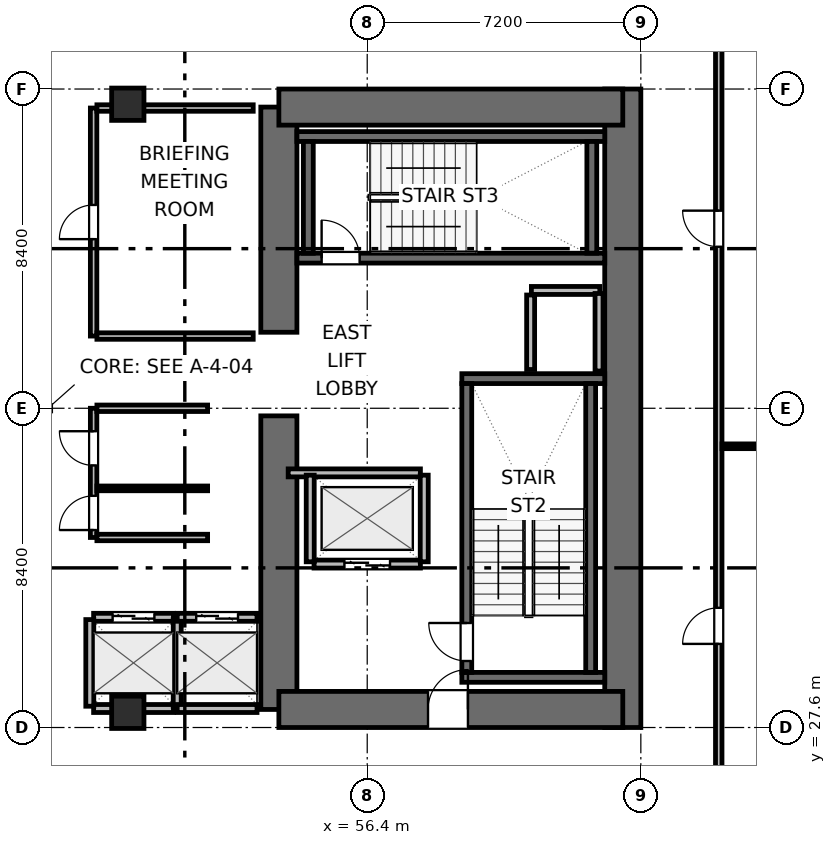
"""IFC4 building model, lengths in metres.
Left out: names, types, materials, properties, quantities, classifications, styles, units other than length and angle.
Written with IfcOpenShell. Run it as: python <this file> out.ifc"""

import sys

from ifc_helpers import new_model, si_unit, direction, frame, frame_2d, origin, origin_2d, place, context, subcontext, project, spatial, rectangle, extrude, element, fill, save


model = new_model("IFC4")
c1 = context("Model", 3, precision=1e-05, world=origin(), true_north=direction((0.0, 1.0)))
c2 = subcontext(c1, "Body", "Model", "MODEL_VIEW")
j1 = project(units=[si_unit("LENGTHUNIT", "METRE"), si_unit("PLANEANGLEUNIT", "RADIAN")], contexts=[c1])
p1 = place(None, origin())
s1 = spatial("IfcSite", under=j1, at=p1, CompositionType="ELEMENT")
p2 = place(p1, origin())
s2 = spatial("IfcBuilding", under=s1, at=p2, CompositionType="ELEMENT")
p3 = place(p2, frame((0.0, 0.0, 21.6)))
s3 = spatial("IfcBuildingStorey", under=s2, at=p3, CompositionType="ELEMENT", Elevation=21.6)
p4 = place(p3, frame((54.075, 28.075, 0.0), z_axis=(0.0, 0.0, 1.0), x_axis=(0.0, 1.0, 0.0)))
e1 = element("IfcWall", 1, at=p4, inside=s3, PredefinedType="SHEAR", context=c2, shape_type="SweptSolid", body=[
    extrude(rectangle(XDim=7.725, YDim=0.95, at=frame_2d((3.863, 0.0))), origin(), (0.0, 0.0, 1.0), 3.9),
])
p5 = place(p3, frame((54.075, 38.0, 0.0), z_axis=(0.0, 0.0, 1.0), x_axis=(0.0, 1.0, 0.0)))
e2 = element("IfcWall", 2, at=p5, inside=s3, PredefinedType="SHEAR", context=c2, shape_type="SweptSolid", body=[
    extrude(rectangle(XDim=5.925, YDim=0.95, at=frame_2d((2.962, 0.0))), origin(), (0.0, 0.0, 1.0), 3.9),
])
p6 = place(p3, frame((63.125, 27.6, 0.0), z_axis=(0.0, 0.0, 1.0), x_axis=(0.0, 1.0, 0.0)))
e3 = element("IfcWall", 3, at=p6, inside=s3, PredefinedType="SHEAR", context=c2, shape_type="SweptSolid", body=[
    extrude(rectangle(XDim=16.8, YDim=0.95, at=frame_2d((8.4, 0.0))), origin(), (0.0, 0.0, 1.0), 3.9),
])
p7 = place(p3, frame((54.075, 28.075, 0.0), z_axis=(0.0, 0.0, 1.0), x_axis=(1.0, 0.0, 0.0)))
e4 = element("IfcWall", 4, at=p7, inside=s3, PredefinedType="SHEAR", context=c2, shape_type="SweptSolid", body=[
    extrude(rectangle(XDim=9.05, YDim=0.95, at=frame_2d((4.525, 0.0))), origin(), (0.0, 0.0, 1.0), 3.9),
])
p8 = place(p7, frame((3.925, 0.0, 0.0)))
e5 = element("IfcOpeningElement", 5, at=p8, cuts=e4, PredefinedType="OPENING", context=c2, shape_type="SweptSolid", body=[
    extrude(rectangle(XDim=1.05, YDim=2.04, at=frame_2d((0.525, 1.02))), frame((0.0, 0.485, 0.0), z_axis=(0.0, -1.0, 0.0), x_axis=(1.0, 0.0, 0.0)), (0.0, 0.0, 1.0), 0.97),
])
p9 = place(p3, frame((54.075, 43.925, 0.0), z_axis=(0.0, 0.0, 1.0), x_axis=(1.0, 0.0, 0.0)))
e6 = element("IfcWall", 6, at=p9, inside=s3, PredefinedType="SHEAR", context=c2, shape_type="SweptSolid", body=[
    extrude(rectangle(XDim=9.05, YDim=0.95, at=frame_2d((4.525, 0.0))), origin(), (0.0, 0.0, 1.0), 3.9),
])
for number, where, z_axis, x_axis in (
    (7, (58.89, 28.92, 0.0), (0.0, 0.0, 1.0), (1.0, 0.0, 0.0)),
    (8, (58.89, 36.78, 0.0), (0.0, 0.0, 1.0), (1.0, 0.0, 0.0)),
):
    element("IfcWall", number, at=place(p3, frame(where, z_axis=z_axis, x_axis=x_axis)), inside=s3, PredefinedType="SHEAR", context=c2, shape_type="SweptSolid", body=[
        extrude(rectangle(XDim=3.76, YDim=0.26, at=frame_2d((1.88, 0.0))), origin(), (0.0, 0.0, 1.0), 3.9),
    ])
p10 = place(p3, frame((59.02, 29.05, 0.0), z_axis=(0.0, 0.0, 1.0), x_axis=(0.0, 1.0, 0.0)))
e9 = element("IfcWall", 9, at=p10, inside=s3, PredefinedType="SHEAR", context=c2, shape_type="SweptSolid", body=[
    extrude(rectangle(XDim=7.6, YDim=0.26, at=frame_2d((3.8, 0.0))), origin(), (0.0, 0.0, 1.0), 3.9),
])
p11 = place(p10, frame((0.3, 0.0, 0.0)))
e10 = element("IfcOpeningElement", 10, at=p11, cuts=e9, PredefinedType="OPENING", context=c2, shape_type="SweptSolid", body=[
    extrude(rectangle(XDim=1.0, YDim=2.04, at=frame_2d((0.5, 1.02))), frame((0.0, 0.14, 0.0), z_axis=(0.0, -1.0, 0.0), x_axis=(1.0, 0.0, 0.0)), (0.0, 0.0, 1.0), 0.28),
])
p12 = place(p3, frame((62.28, 29.05, 0.0), z_axis=(0.0, 0.0, 1.0), x_axis=(0.0, 1.0, 0.0)))
e11 = element("IfcWall", 11, at=p12, inside=s3, PredefinedType="SHEAR", context=c2, shape_type="SweptSolid", body=[
    extrude(rectangle(XDim=7.6, YDim=0.26, at=frame_2d((3.8, 0.0))), origin(), (0.0, 0.0, 1.0), 3.9),
])
p13 = place(p3, frame((54.55, 39.95, 0.0), z_axis=(0.0, 0.0, 1.0), x_axis=(1.0, 0.0, 0.0)))
e12 = element("IfcWall", 12, at=p13, inside=s3, PredefinedType="SHEAR", context=c2, shape_type="SweptSolid", body=[
    extrude(rectangle(XDim=8.1, YDim=0.26, at=frame_2d((4.05, 0.0))), origin(), (0.0, 0.0, 1.0), 3.9),
])
p14 = place(p13, frame((0.65, 0.0, 0.0)))
e13 = element("IfcOpeningElement", 13, at=p14, cuts=e12, PredefinedType="OPENING", context=c2, shape_type="SweptSolid", body=[
    extrude(rectangle(XDim=1.0, YDim=2.04, at=frame_2d((0.5, 1.02))), frame((0.0, 0.14, 0.0), z_axis=(0.0, -1.0, 0.0), x_axis=(1.0, 0.0, 0.0)), (0.0, 0.0, 1.0), 0.28),
])
p15 = place(p3, frame((54.55, 43.15, 0.0), z_axis=(0.0, 0.0, 1.0), x_axis=(1.0, 0.0, 0.0)))
e14 = element("IfcWall", 14, at=p15, inside=s3, PredefinedType="SHEAR", context=c2, shape_type="SweptSolid", body=[
    extrude(rectangle(XDim=8.1, YDim=0.26, at=frame_2d((4.05, 0.0))), origin(), (0.0, 0.0, 1.0), 3.9),
])
for number, where, z_axis, x_axis in (
    (15, (54.85, 40.08, 0.0), (0.0, 0.0, 1.0), (0.0, 1.0, 0.0)),
    (16, (62.31, 40.08, 0.0), (0.0, 0.0, 1.0), (0.0, 1.0, 0.0)),
):
    element("IfcWall", number, at=place(p3, frame(where, z_axis=z_axis, x_axis=x_axis)), inside=s3, PredefinedType="SHEAR", context=c2, shape_type="SweptSolid", body=[
        extrude(rectangle(XDim=2.94, YDim=0.26, at=frame_2d((1.47, 0.0))), origin(), (0.0, 0.0, 1.0), 3.9),
    ])
for number, where, z_axis, x_axis in (
    (17, (50.1, 28.0, 0.0), (0.0, 0.0, 1.0), (1.0, 0.0, 0.0)),
    (18, (50.1, 44.0, 0.0), (0.0, 0.0, 1.0), (1.0, 0.0, 0.0)),
):
    element("IfcColumn", number, at=place(p3, frame(where, z_axis=z_axis, x_axis=x_axis)), inside=s3, PredefinedType="COLUMN", context=c2, shape_type="SweptSolid", body=[
        extrude(rectangle(XDim=0.85, YDim=0.85, at=origin_2d()), origin(), (0.0, 0.0, 1.0), 3.9),
    ])
p16 = place(p3, frame((60.72, 39.1, 0.0), z_axis=(0.0, 0.0, 1.0), x_axis=(1.0, 0.0, 0.0)))
e19 = element("IfcWall", 19, at=p16, inside=s3, PredefinedType="PARTITIONING", context=c2, shape_type="SweptSolid", body=[
    extrude(rectangle(XDim=1.8, YDim=0.21, at=frame_2d((0.9, 0.0))), origin(), (0.0, 0.0, 1.0), 3.64),
])
p17 = place(p3, frame((60.7, 37.02, 0.0), z_axis=(0.0, 0.0, 1.0), x_axis=(0.0, 1.0, 0.0)))
e20 = element("IfcWall", 20, at=p17, inside=s3, PredefinedType="PARTITIONING", context=c2, shape_type="SweptSolid", body=[
    extrude(rectangle(XDim=1.96, YDim=0.21, at=frame_2d((0.98, 0.0))), origin(), (0.0, 0.0, 1.0), 3.64),
])
p18 = place(p3, frame((62.5, 36.98, 0.0), z_axis=(0.0, 0.0, 1.0), x_axis=(0.0, 1.0, 0.0)))
e21 = element("IfcWall", 21, at=p18, inside=s3, PredefinedType="PARTITIONING", context=c2, shape_type="SweptSolid", body=[
    extrude(rectangle(XDim=2.04, YDim=0.21, at=frame_2d((1.02, 0.0))), origin(), (0.0, 0.0, 1.0), 3.64),
])
p19 = place(p3, frame((55.0, 31.9, 0.0), z_axis=(0.0, 0.0, 1.0), x_axis=(1.0, 0.0, 0.0)))
e22 = element("IfcWall", 22, at=p19, inside=s3, PredefinedType="PARTITIONING", context=c2, shape_type="SweptSolid", body=[
    extrude(rectangle(XDim=2.8, YDim=0.21, at=frame_2d((1.4, 0.0))), origin(), (0.0, 0.0, 1.0), 3.64),
])
p20 = place(p19, frame((0.8, 0.0, 0.0)))
e23 = element("IfcOpeningElement", 23, at=p20, cuts=e22, PredefinedType="OPENING", context=c2, shape_type="SweptSolid", body=[
    extrude(rectangle(XDim=1.2, YDim=2.04, at=frame_2d((0.6, 1.02))), frame((0.0, 0.115, 0.0), z_axis=(0.0, -1.0, 0.0), x_axis=(1.0, 0.0, 0.0)), (0.0, 0.0, 1.0), 0.23),
])
p21 = place(p3, frame((54.32, 34.3, 0.0), z_axis=(0.0, 0.0, 1.0), x_axis=(1.0, 0.0, 0.0)))
e24 = element("IfcWall", 24, at=p21, inside=s3, PredefinedType="PARTITIONING", context=c2, shape_type="SweptSolid", body=[
    extrude(rectangle(XDim=3.48, YDim=0.21, at=frame_2d((1.74, 0.0))), origin(), (0.0, 0.0, 1.0), 3.64),
])
for number, where, z_axis, x_axis in (
    (25, (54.9, 31.96, 0.0), (0.0, 0.0, 1.0), (0.0, 1.0, 0.0)),
    (26, (57.9, 31.96, 0.0), (0.0, 0.0, 1.0), (0.0, 1.0, 0.0)),
):
    element("IfcWall", number, at=place(p3, frame(where, z_axis=z_axis, x_axis=x_axis)), inside=s3, PredefinedType="PARTITIONING", context=c2, shape_type="SweptSolid", body=[
        extrude(rectangle(XDim=2.28, YDim=0.21, at=frame_2d((1.14, 0.0))), origin(), (0.0, 0.0, 1.0), 3.64),
    ])
p22 = place(p3, frame((49.2, 30.5, 0.0), z_axis=(0.0, 0.0, 1.0), x_axis=(1.0, 0.0, 0.0)))
e27 = element("IfcWall", 27, at=p22, inside=s3, PredefinedType="PARTITIONING", context=c2, shape_type="SweptSolid", body=[
    extrude(rectangle(XDim=2.1, YDim=0.21, at=frame_2d((1.05, 0.0))), origin(), (0.0, 0.0, 1.0), 3.64),
])
p23 = place(p22, frame((0.5, 0.0, 0.0)))
e28 = element("IfcOpeningElement", 28, at=p23, cuts=e27, PredefinedType="OPENING", context=c2, shape_type="SweptSolid", body=[
    extrude(rectangle(XDim=1.1, YDim=2.04, at=frame_2d((0.55, 1.02))), frame((0.0, 0.115, 0.0), z_axis=(0.0, -1.0, 0.0), x_axis=(1.0, 0.0, 0.0)), (0.0, 0.0, 1.0), 0.23),
])
p24 = place(p3, frame((49.2, 28.1, 0.0), z_axis=(0.0, 0.0, 1.0), x_axis=(1.0, 0.0, 0.0)))
e29 = element("IfcWall", 29, at=p24, inside=s3, PredefinedType="PARTITIONING", context=c2, shape_type="SweptSolid", body=[
    extrude(rectangle(XDim=2.1, YDim=0.21, at=frame_2d((1.05, 0.0))), origin(), (0.0, 0.0, 1.0), 2.525),
])
for number, where, z_axis, x_axis in (
    (30, (49.1, 28.16, 0.0), (0.0, 0.0, 1.0), (0.0, 1.0, 0.0)),
    (31, (51.4, 28.16, 0.0), (0.0, 0.0, 1.0), (0.0, 1.0, 0.0)),
):
    element("IfcWall", number, at=place(p3, frame(where, z_axis=z_axis, x_axis=x_axis)), inside=s3, PredefinedType="PARTITIONING", context=c2, shape_type="SweptSolid", body=[
        extrude(rectangle(XDim=2.28, YDim=0.21, at=frame_2d((1.14, 0.0))), origin(), (0.0, 0.0, 1.0), 3.64),
    ])
p25 = place(p3, frame((51.4, 30.5, 0.0), z_axis=(0.0, 0.0, 1.0), x_axis=(1.0, 0.0, 0.0)))
e32 = element("IfcWall", 32, at=p25, inside=s3, PredefinedType="PARTITIONING", context=c2, shape_type="SweptSolid", body=[
    extrude(rectangle(XDim=2.1, YDim=0.21, at=frame_2d((1.05, 0.0))), origin(), (0.0, 0.0, 1.0), 3.64),
])
p26 = place(p25, frame((0.5, 0.0, 0.0)))
e33 = element("IfcOpeningElement", 33, at=p26, cuts=e32, PredefinedType="OPENING", context=c2, shape_type="SweptSolid", body=[
    extrude(rectangle(XDim=1.1, YDim=2.04, at=frame_2d((0.55, 1.02))), frame((0.0, 0.115, 0.0), z_axis=(0.0, -1.0, 0.0), x_axis=(1.0, 0.0, 0.0)), (0.0, 0.0, 1.0), 0.23),
])
p27 = place(p3, frame((51.4, 28.1, 0.0), z_axis=(0.0, 0.0, 1.0), x_axis=(1.0, 0.0, 0.0)))
e34 = element("IfcWall", 34, at=p27, inside=s3, PredefinedType="PARTITIONING", context=c2, shape_type="SweptSolid", body=[
    extrude(rectangle(XDim=2.1, YDim=0.21, at=frame_2d((1.05, 0.0))), origin(), (0.0, 0.0, 1.0), 2.525),
])
p28 = place(p3, frame((49.2, 32.6, 0.0), z_axis=(0.0, 0.0, 1.0), x_axis=(0.0, 1.0, 0.0)))
e35 = element("IfcWall", 35, at=p28, inside=s3, PredefinedType="PARTITIONING", context=c2, shape_type="SweptSolid", body=[
    extrude(rectangle(XDim=3.4, YDim=0.17, at=frame_2d((1.7, 0.0))), origin(), (0.0, 0.0, 1.0), 3.64),
])
p29 = place(p28, frame((0.196, 0.0, 0.0)))
e36 = element("IfcOpeningElement", 36, at=p29, cuts=e35, PredefinedType="OPENING", context=c2, shape_type="SweptSolid", body=[
    extrude(rectangle(XDim=0.9, YDim=2.02, at=frame_2d((0.45, 1.01))), frame((0.0, 0.095, 0.0), z_axis=(0.0, -1.0, 0.0), x_axis=(1.0, 0.0, 0.0)), (0.0, 0.0, 1.0), 0.19),
])
p30 = place(p28, frame((1.896, 0.0, 0.0)))
e37 = element("IfcOpeningElement", 37, at=p30, cuts=e35, PredefinedType="OPENING", context=c2, shape_type="SweptSolid", body=[
    extrude(rectangle(XDim=0.9, YDim=2.02, at=frame_2d((0.45, 1.01))), frame((0.0, 0.095, 0.0), z_axis=(0.0, -1.0, 0.0), x_axis=(1.0, 0.0, 0.0)), (0.0, 0.0, 1.0), 0.19),
])
for number, where, z_axis, x_axis in (
    (38, (49.287, 32.6, 0.0), (0.0, 0.0, 1.0), (1.0, 0.0, 0.0)),
    (39, (49.287, 36.0, 0.0), (0.0, 0.0, 1.0), (1.0, 0.0, 0.0)),
):
    element("IfcWall", number, at=place(p3, frame(where, z_axis=z_axis, x_axis=x_axis)), inside=s3, PredefinedType="PARTITIONING", context=c2, shape_type="SweptSolid", body=[
        extrude(rectangle(XDim=2.913, YDim=0.17, at=frame_2d((1.457, 0.0))), origin(), (0.0, 0.0, 1.0), 3.64),
    ])
p31 = place(p3, frame((49.287, 33.892, 0.0), z_axis=(0.0, 0.0, 1.0), x_axis=(1.0, 0.0, 0.0)))
e40 = element("IfcWall", 40, at=p31, inside=s3, PredefinedType="PARTITIONING", context=c2, shape_type="SweptSolid", body=[
    extrude(rectangle(XDim=2.913, YDim=0.125, at=frame_2d((1.457, 0.0))), origin(), (0.0, 0.0, 1.0), 3.64),
])
p32 = place(p3, frame((49.2, 37.9, 0.0), z_axis=(0.0, 0.0, 1.0), x_axis=(0.0, 1.0, 0.0)))
e41 = element("IfcWall", 41, at=p32, inside=s3, PredefinedType="PARTITIONING", context=c2, shape_type="SweptSolid", body=[
    extrude(rectangle(XDim=6.0, YDim=0.17, at=frame_2d((3.0, 0.0))), origin(), (0.0, 0.0, 1.0), 3.64),
])
p33 = place(p32, frame((2.55, 0.0, 0.0)))
e42 = element("IfcOpeningElement", 42, at=p33, cuts=e41, PredefinedType="OPENING", context=c2, shape_type="SweptSolid", body=[
    extrude(rectangle(XDim=0.9, YDim=2.02, at=frame_2d((0.45, 1.01))), frame((0.0, 0.095, 0.0), z_axis=(0.0, -1.0, 0.0), x_axis=(1.0, 0.0, 0.0)), (0.0, 0.0, 1.0), 0.19),
])
p34 = place(p3, frame((49.287, 37.9, 0.0), z_axis=(0.0, 0.0, 1.0), x_axis=(1.0, 0.0, 0.0)))
e43 = element("IfcWall", 43, at=p34, inside=s3, PredefinedType="PARTITIONING", context=c2, shape_type="SweptSolid", body=[
    extrude(rectangle(XDim=4.113, YDim=0.17, at=frame_2d((2.056, 0.0))), origin(), (0.0, 0.0, 1.0), 3.64),
])
p35 = place(p3, frame((49.287, 43.9, 0.0), z_axis=(0.0, 0.0, 1.0), x_axis=(1.0, 0.0, 0.0)))
e44 = element("IfcWall", 44, at=p35, inside=s3, PredefinedType="PARTITIONING", context=c2, shape_type="SweptSolid", body=[
    extrude(rectangle(XDim=4.113, YDim=0.17, at=frame_2d((2.056, 0.0))), origin(), (0.0, 0.0, 1.0), 2.525),
])
p36 = place(p3, frame((65.65, 25.637, 0.0), z_axis=(0.0, 0.0, 1.0), x_axis=(0.0, 1.0, 0.0)))
e45 = element("IfcWall", 45, at=p36, inside=s3, PredefinedType="PARTITIONING", context=c2, shape_type="SweptSolid", body=[
    extrude(rectangle(XDim=20.726, YDim=0.17, at=frame_2d((10.363, 0.0))), origin(), (0.0, 0.0, 1.0), 3.64),
])
p37 = place(p36, frame((4.163, 0.0, 0.0)))
e46 = element("IfcOpeningElement", 46, at=p37, cuts=e45, PredefinedType="OPENING", context=c2, shape_type="SweptSolid", body=[
    extrude(rectangle(XDim=0.95, YDim=2.04, at=frame_2d((0.475, 1.02))), frame((0.0, 0.095, 0.0), z_axis=(0.0, -1.0, 0.0), x_axis=(1.0, 0.0, 0.0)), (0.0, 0.0, 1.0), 0.19),
])
p38 = place(p36, frame((14.613, 0.0, 0.0)))
e47 = element("IfcOpeningElement", 47, at=p38, cuts=e45, PredefinedType="OPENING", context=c2, shape_type="SweptSolid", body=[
    extrude(rectangle(XDim=0.95, YDim=2.04, at=frame_2d((0.475, 1.02))), frame((0.0, 0.095, 0.0), z_axis=(0.0, -1.0, 0.0), x_axis=(1.0, 0.0, 0.0)), (0.0, 0.0, 1.0), 0.19),
])
p39 = place(p3, frame((65.737, 35.0, 0.0), z_axis=(0.0, 0.0, 1.0), x_axis=(1.0, 0.0, 0.0)))
e48 = element("IfcWall", 48, at=p39, inside=s3, PredefinedType="PARTITIONING", context=c2, shape_type="SweptSolid", body=[
    extrude(rectangle(XDim=13.218, YDim=0.125, at=frame_2d((6.609, 0.0))), origin(), (0.0, 0.0, 1.0), 3.64),
])
p40 = place(p11, origin())
e49 = element("IfcDoor", 49, at=p40, inside=s3, OperationType="SINGLE_SWING_RIGHT", PredefinedType="DOOR", context=c2, shape_type="SweptSolid", body=[
    extrude(rectangle(XDim=1.0, YDim=2.04, at=frame_2d((0.5, 1.02))), frame((0.0, 0.025, 0.0), z_axis=(0.0, -1.0, 0.0), x_axis=(1.0, 0.0, 0.0)), (0.0, 0.0, 1.0), 0.05),
])
fill(e10, e49)
p41 = place(p14, origin())
e50 = element("IfcDoor", 50, at=p41, inside=s3, OperationType="SINGLE_SWING_LEFT", PredefinedType="DOOR", context=c2, shape_type="SweptSolid", body=[
    extrude(rectangle(XDim=1.0, YDim=2.04, at=frame_2d((0.5, 1.02))), frame((0.0, 0.025, 0.0), z_axis=(0.0, -1.0, 0.0), x_axis=(1.0, 0.0, 0.0)), (0.0, 0.0, 1.0), 0.05),
])
fill(e13, e50)
p42 = place(p20, origin())
e51 = element("IfcDoor", 51, at=p42, inside=s3, OperationType="DOUBLE_DOOR_SLIDING", PredefinedType="DOOR", context=c2, shape_type="SweptSolid", body=[
    extrude(rectangle(XDim=1.2, YDim=2.04, at=frame_2d((0.6, 1.02))), frame((0.0, 0.025, 0.0), z_axis=(0.0, -1.0, 0.0), x_axis=(1.0, 0.0, 0.0)), (0.0, 0.0, 1.0), 0.05),
])
fill(e23, e51)
p43 = place(p23, origin())
e52 = element("IfcDoor", 52, at=p43, inside=s3, OperationType="DOUBLE_DOOR_SLIDING", PredefinedType="DOOR", context=c2, shape_type="SweptSolid", body=[
    extrude(rectangle(XDim=1.1, YDim=2.04, at=frame_2d((0.55, 1.02))), frame((0.0, 0.025, 0.0), z_axis=(0.0, -1.0, 0.0), x_axis=(1.0, 0.0, 0.0)), (0.0, 0.0, 1.0), 0.05),
])
fill(e28, e52)
p44 = place(p26, origin())
e53 = element("IfcDoor", 53, at=p44, inside=s3, OperationType="DOUBLE_DOOR_SLIDING", PredefinedType="DOOR", context=c2, shape_type="SweptSolid", body=[
    extrude(rectangle(XDim=1.1, YDim=2.04, at=frame_2d((0.55, 1.02))), frame((0.0, 0.025, 0.0), z_axis=(0.0, -1.0, 0.0), x_axis=(1.0, 0.0, 0.0)), (0.0, 0.0, 1.0), 0.05),
])
fill(e33, e53)
p45 = place(p8, origin())
e54 = element("IfcDoor", 54, at=p45, inside=s3, OperationType="SINGLE_SWING_RIGHT", PredefinedType="DOOR", context=c2, shape_type="SweptSolid", body=[
    extrude(rectangle(XDim=1.05, YDim=2.04, at=frame_2d((0.525, 1.02))), frame((0.0, 0.025, 0.0), z_axis=(0.0, -1.0, 0.0), x_axis=(1.0, 0.0, 0.0)), (0.0, 0.0, 1.0), 0.05),
])
fill(e5, e54)
p46 = place(p29, origin())
e55 = element("IfcDoor", 55, at=p46, inside=s3, OperationType="SINGLE_SWING_LEFT", PredefinedType="DOOR", context=c2, shape_type="SweptSolid", body=[
    extrude(rectangle(XDim=0.9, YDim=2.02, at=frame_2d((0.45, 1.01))), frame((0.0, 0.025, 0.0), z_axis=(0.0, -1.0, 0.0), x_axis=(1.0, 0.0, 0.0)), (0.0, 0.0, 1.0), 0.05),
])
fill(e36, e55)
p47 = place(p30, origin())
e56 = element("IfcDoor", 56, at=p47, inside=s3, OperationType="SINGLE_SWING_RIGHT", PredefinedType="DOOR", context=c2, shape_type="SweptSolid", body=[
    extrude(rectangle(XDim=0.9, YDim=2.02, at=frame_2d((0.45, 1.01))), frame((0.0, 0.025, 0.0), z_axis=(0.0, -1.0, 0.0), x_axis=(1.0, 0.0, 0.0)), (0.0, 0.0, 1.0), 0.05),
])
fill(e37, e56)
p48 = place(p33, origin())
e57 = element("IfcDoor", 57, at=p48, inside=s3, OperationType="SINGLE_SWING_LEFT", PredefinedType="DOOR", context=c2, shape_type="SweptSolid", body=[
    extrude(rectangle(XDim=0.9, YDim=2.02, at=frame_2d((0.45, 1.01))), frame((0.0, 0.025, 0.0), z_axis=(0.0, -1.0, 0.0), x_axis=(1.0, 0.0, 0.0)), (0.0, 0.0, 1.0), 0.05),
])
fill(e42, e57)
p49 = place(p37, origin())
e58 = element("IfcDoor", 58, at=p49, inside=s3, OperationType="SINGLE_SWING_LEFT", PredefinedType="DOOR", context=c2, shape_type="SweptSolid", body=[
    extrude(rectangle(XDim=0.95, YDim=2.04, at=frame_2d((0.475, 1.02))), frame((0.0, 0.025, 0.0), z_axis=(0.0, -1.0, 0.0), x_axis=(1.0, 0.0, 0.0)), (0.0, 0.0, 1.0), 0.05),
])
fill(e46, e58)
p50 = place(p38, origin())
e59 = element("IfcDoor", 59, at=p50, inside=s3, OperationType="SINGLE_SWING_RIGHT", PredefinedType="DOOR", context=c2, shape_type="SweptSolid", body=[
    extrude(rectangle(XDim=0.95, YDim=2.04, at=frame_2d((0.475, 1.02))), frame((0.0, 0.025, 0.0), z_axis=(0.0, -1.0, 0.0), x_axis=(1.0, 0.0, 0.0)), (0.0, 0.0, 1.0), 0.05),
])
fill(e47, e59)
save(model, sys.argv[1])
